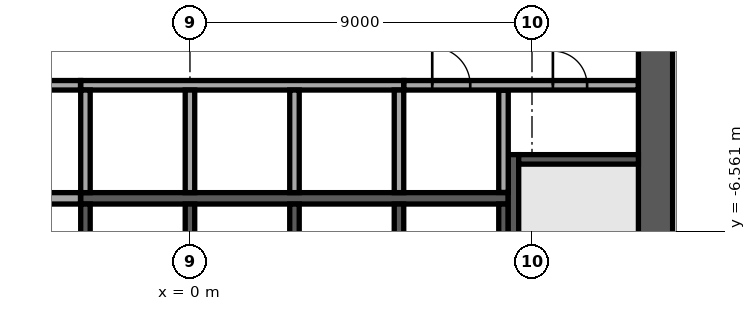
"""IFC4 building model, lengths in metres.
Left out: names, types, materials, properties, quantities, classifications, styles, units other than length and angle.
Written with IfcOpenShell. Run it as: python <this file> out.ifc"""

import sys

from ifc_helpers import new_model, si_unit, direction, frame, frame_2d, origin, place, context, subcontext, project, spatial, rectangle, extrude, element, fill, save


model = new_model("IFC4")
c1 = context("Model", 3, precision=1e-05, world=origin(), true_north=direction((0.0, 1.0)))
c2 = subcontext(c1, "Body", "Model", "MODEL_VIEW")
j1 = project(units=[si_unit("LENGTHUNIT", "METRE"), si_unit("PLANEANGLEUNIT", "RADIAN")], contexts=[c1])
p1 = place(None, origin())
s1 = spatial("IfcSite", under=j1, at=p1, CompositionType="ELEMENT")
p2 = place(p1, origin())
s2 = spatial("IfcBuilding", under=s1, at=p2, CompositionType="ELEMENT")
p3 = place(p2, frame((0.0, 0.0, 189.3)))
s3 = spatial("IfcBuildingStorey", under=s2, at=p3, CompositionType="ELEMENT", Elevation=189.3)
p4 = place(p3, frame((12.25, -11.8, 0.0), z_axis=(0.0, 0.0, 1.0), x_axis=(0.0, 1.0, 0.0)))
e1 = element("IfcWall", 1, at=p4, inside=s3, PredefinedType="SHEAR", context=c2, shape_type="SweptSolid", body=[
    extrude(rectangle(XDim=23.6, YDim=0.9, at=frame_2d((11.8, 0.0))), origin(), (0.0, 0.0, 1.0), 3.62),
])
p5 = place(p4, frame((10.6, 0.0, 0.0)))
e2 = element("IfcOpeningElement", 2, at=p5, cuts=e1, PredefinedType="OPENING", context=c2, shape_type="SweptSolid", body=[
    extrude(rectangle(XDim=2.4, YDim=2.4, at=frame_2d((1.2, 1.2))), frame((0.0, 0.46, 0.0), z_axis=(0.0, -1.0, 0.0), x_axis=(1.0, 0.0, 0.0)), (0.0, 0.0, 1.0), 0.92),
])
p6 = place(p3, frame((-2.875, -5.7, 0.0), z_axis=(0.0, 0.0, 1.0), x_axis=(1.0, 0.0, 0.0)))
e3 = element("IfcWall", 3, at=p6, inside=s3, PredefinedType="SOLIDWALL", context=c2, shape_type="SweptSolid", body=[
    extrude(rectangle(XDim=11.25, YDim=0.3, at=frame_2d((5.625, 0.0))), origin(), (0.0, 0.0, 1.0), 3.62),
])
p7 = place(p3, frame((-2.875, -2.725, 0.0), z_axis=(0.0, 0.0, 1.0), x_axis=(1.0, 0.0, 0.0)))
e4 = element("IfcWall", 4, at=p7, inside=s3, PredefinedType="SOLIDWALL", context=c2, shape_type="SweptSolid", body=[
    extrude(rectangle(XDim=8.5, YDim=0.25, at=frame_2d((4.25, 0.0))), origin(), (0.0, 0.0, 1.0), 3.62),
])
for number, where, z_axis, x_axis in (
    (5, (-2.75, -5.55, 0.0), (0.0, 0.0, 1.0), (0.0, 1.0, 0.0)),
    (6, (0.0, -5.55, 0.0), (0.0, 0.0, 1.0), (0.0, 1.0, 0.0)),
    (7, (2.75, -5.55, 0.0), (0.0, 0.0, 1.0), (0.0, 1.0, 0.0)),
    (8, (5.5, -5.55, 0.0), (0.0, 0.0, 1.0), (0.0, 1.0, 0.0)),
    (9, (-2.75, -8.55, 0.0), (0.0, 0.0, 1.0), (0.0, 1.0, 0.0)),
    (10, (0.0, -8.55, 0.0), (0.0, 0.0, 1.0), (0.0, 1.0, 0.0)),
    (11, (2.75, -8.55, 0.0), (0.0, 0.0, 1.0), (0.0, 1.0, 0.0)),
    (12, (5.5, -8.55, 0.0), (0.0, 0.0, 1.0), (0.0, 1.0, 0.0)),
    (13, (8.25, -8.55, 0.0), (0.0, 0.0, 1.0), (0.0, 1.0, 0.0)),
):
    element("IfcWall", number, at=place(p3, frame(where, z_axis=z_axis, x_axis=x_axis)), inside=s3, PredefinedType="SOLIDWALL", context=c2, shape_type="SweptSolid", body=[
        extrude(rectangle(XDim=2.7, YDim=0.25, at=frame_2d((1.35, 0.0))), origin(), (0.0, 0.0, 1.0), 3.62),
    ])
p8 = place(p3, frame((8.512, -4.55, 0.0), z_axis=(0.0, 0.0, 1.0), x_axis=(0.0, -1.0, 0.0)))
e14 = element("IfcWall", 14, at=p8, inside=s3, PredefinedType="SOLIDWALL", context=c2, shape_type="SweptSolid", body=[
    extrude(rectangle(XDim=7.25, YDim=0.275, at=frame_2d((3.625, 0.0))), origin(), (0.0, 0.0, 1.0), 3.62),
])
p9 = place(p8, frame((6.0, 0.0, 0.0)))
e15 = element("IfcOpeningElement", 15, at=p9, cuts=e14, PredefinedType="OPENING", context=c2, shape_type="SweptSolid", body=[
    extrude(rectangle(XDim=1.0, YDim=2.1, at=frame_2d((0.5, 1.05))), frame((0.0, 0.147, 0.0), z_axis=(0.0, -1.0, 0.0), x_axis=(1.0, 0.0, 0.0)), (0.0, 0.0, 1.0), 0.295),
])
p10 = place(p3, frame((8.65, -4.675, 0.0), z_axis=(0.0, 0.0, 1.0), x_axis=(1.0, 0.0, 0.0)))
e16 = element("IfcWall", 16, at=p10, inside=s3, PredefinedType="SOLIDWALL", context=c2, shape_type="SweptSolid", body=[
    extrude(rectangle(XDim=3.15, YDim=0.25, at=frame_2d((1.575, 0.0))), origin(), (0.0, 0.0, 1.0), 3.62),
])
p11 = place(p3, frame((-8.35, -5.7, 0.0), z_axis=(0.0, 0.0, 1.0), x_axis=(1.0, 0.0, 0.0)))
e17 = element("IfcWall", 17, at=p11, inside=s3, PredefinedType="PARTITIONING", context=c2, shape_type="SweptSolid", body=[
    extrude(rectangle(XDim=5.47, YDim=0.3, at=frame_2d((2.735, 0.0))), origin(), (0.0, 0.0, 1.0), 3.62),
])
p12 = place(p3, frame((8.25, -5.545, 0.0), z_axis=(0.0, 0.0, 1.0), x_axis=(0.0, 1.0, 0.0)))
e18 = element("IfcWall", 18, at=p12, inside=s3, PredefinedType="PARTITIONING", context=c2, shape_type="SweptSolid", body=[
    extrude(rectangle(XDim=2.69, YDim=0.25, at=frame_2d((1.345, 0.0))), origin(), (0.0, 0.0, 1.0), 3.62),
])
p13 = place(p3, frame((-11.795, -2.725, 0.0), z_axis=(0.0, 0.0, 1.0), x_axis=(1.0, 0.0, 0.0)))
e19 = element("IfcWall", 19, at=p13, inside=s3, PredefinedType="PARTITIONING", context=c2, shape_type="SweptSolid", body=[
    extrude(rectangle(XDim=8.915, YDim=0.25, at=frame_2d((4.458, 0.0))), origin(), (0.0, 0.0, 1.0), 3.62),
])
p14 = place(p13, frame((1.295, 0.0, 0.0)))
e20 = element("IfcOpeningElement", 20, at=p14, cuts=e19, PredefinedType="OPENING", context=c2, shape_type="SweptSolid", body=[
    extrude(rectangle(XDim=1.0, YDim=2.1, at=frame_2d((0.5, 1.05))), frame((0.0, 0.135, 0.0), z_axis=(0.0, -1.0, 0.0), x_axis=(1.0, 0.0, 0.0)), (0.0, 0.0, 1.0), 0.27),
])
p15 = place(p13, frame((4.42, 0.0, 0.0)))
e21 = element("IfcOpeningElement", 21, at=p15, cuts=e19, PredefinedType="OPENING", context=c2, shape_type="SweptSolid", body=[
    extrude(rectangle(XDim=1.0, YDim=2.1, at=frame_2d((0.5, 1.05))), frame((0.0, 0.135, 0.0), z_axis=(0.0, -1.0, 0.0), x_axis=(1.0, 0.0, 0.0)), (0.0, 0.0, 1.0), 0.27),
])
p16 = place(p3, frame((5.63, -2.725, 0.0), z_axis=(0.0, 0.0, 1.0), x_axis=(1.0, 0.0, 0.0)))
e22 = element("IfcWall", 22, at=p16, inside=s3, PredefinedType="PARTITIONING", context=c2, shape_type="SweptSolid", body=[
    extrude(rectangle(XDim=6.165, YDim=0.25, at=frame_2d((3.083, 0.0))), origin(), (0.0, 0.0, 1.0), 3.62),
])
p17 = place(p16, frame((0.745, 0.0, 0.0)))
e23 = element("IfcOpeningElement", 23, at=p17, cuts=e22, PredefinedType="OPENING", context=c2, shape_type="SweptSolid", body=[
    extrude(rectangle(XDim=1.0, YDim=2.1, at=frame_2d((0.5, 1.05))), frame((0.0, 0.135, 0.0), z_axis=(0.0, -1.0, 0.0), x_axis=(1.0, 0.0, 0.0)), (0.0, 0.0, 1.0), 0.27),
])
p18 = place(p16, frame((3.92, 0.0, 0.0)))
e24 = element("IfcOpeningElement", 24, at=p18, cuts=e22, PredefinedType="OPENING", context=c2, shape_type="SweptSolid", body=[
    extrude(rectangle(XDim=0.9, YDim=2.1, at=frame_2d((0.45, 1.05))), frame((0.0, 0.135, 0.0), z_axis=(0.0, -1.0, 0.0), x_axis=(1.0, 0.0, 0.0)), (0.0, 0.0, 1.0), 0.27),
])
p19 = place(p3, frame((-2.286, -34.715, 0.0), z_axis=(0.0, 0.0, 1.0), x_axis=(0.754708272811, 0.656060532993, 0.0)))
e25 = element("IfcWall", 25, at=p19, inside=s3, PredefinedType="STANDARD", context=c2, shape_type="SweptSolid", body=[
    extrude(rectangle(XDim=49.0, YDim=0.6, at=frame_2d((24.5, 0.0))), origin(), (0.0, 0.0, 1.0), 3.62),
])
p20 = place(p19, frame((1.227, 0.0, 0.9)))
e26 = element("IfcOpeningElement", 26, at=p20, cuts=e25, PredefinedType="OPENING", context=c2, shape_type="SweptSolid", body=[
    extrude(rectangle(XDim=2.0, YDim=2.1, at=frame_2d((1.0, 1.05))), frame((0.0, 0.31, 0.0), z_axis=(0.0, -1.0, 0.0), x_axis=(1.0, 0.0, 0.0)), (0.0, 0.0, 1.0), 0.62),
])
p21 = place(p19, frame((5.682, 0.0, 0.9)))
e27 = element("IfcOpeningElement", 27, at=p21, cuts=e25, PredefinedType="OPENING", context=c2, shape_type="SweptSolid", body=[
    extrude(rectangle(XDim=2.0, YDim=2.1, at=frame_2d((1.0, 1.05))), frame((0.0, 0.31, 0.0), z_axis=(0.0, -1.0, 0.0), x_axis=(1.0, 0.0, 0.0)), (0.0, 0.0, 1.0), 0.62),
])
p22 = place(p19, frame((10.136, 0.0, 0.9)))
e28 = element("IfcOpeningElement", 28, at=p22, cuts=e25, PredefinedType="OPENING", context=c2, shape_type="SweptSolid", body=[
    extrude(rectangle(XDim=2.0, YDim=2.1, at=frame_2d((1.0, 1.05))), frame((0.0, 0.31, 0.0), z_axis=(0.0, -1.0, 0.0), x_axis=(1.0, 0.0, 0.0)), (0.0, 0.0, 1.0), 0.62),
])
p23 = place(p19, frame((14.591, 0.0, 0.9)))
e29 = element("IfcOpeningElement", 29, at=p23, cuts=e25, PredefinedType="OPENING", context=c2, shape_type="SweptSolid", body=[
    extrude(rectangle(XDim=2.0, YDim=2.1, at=frame_2d((1.0, 1.05))), frame((0.0, 0.31, 0.0), z_axis=(0.0, -1.0, 0.0), x_axis=(1.0, 0.0, 0.0)), (0.0, 0.0, 1.0), 0.62),
])
p24 = place(p19, frame((19.045, 0.0, 0.9)))
e30 = element("IfcOpeningElement", 30, at=p24, cuts=e25, PredefinedType="OPENING", context=c2, shape_type="SweptSolid", body=[
    extrude(rectangle(XDim=2.0, YDim=2.1, at=frame_2d((1.0, 1.05))), frame((0.0, 0.31, 0.0), z_axis=(0.0, -1.0, 0.0), x_axis=(1.0, 0.0, 0.0)), (0.0, 0.0, 1.0), 0.62),
])
p25 = place(p19, frame((23.5, 0.0, 0.9)))
e31 = element("IfcOpeningElement", 31, at=p25, cuts=e25, PredefinedType="OPENING", context=c2, shape_type="SweptSolid", body=[
    extrude(rectangle(XDim=2.0, YDim=2.1, at=frame_2d((1.0, 1.05))), frame((0.0, 0.31, 0.0), z_axis=(0.0, -1.0, 0.0), x_axis=(1.0, 0.0, 0.0)), (0.0, 0.0, 1.0), 0.62),
])
p26 = place(p19, frame((27.955, 0.0, 0.9)))
e32 = element("IfcOpeningElement", 32, at=p26, cuts=e25, PredefinedType="OPENING", context=c2, shape_type="SweptSolid", body=[
    extrude(rectangle(XDim=2.0, YDim=2.1, at=frame_2d((1.0, 1.05))), frame((0.0, 0.31, 0.0), z_axis=(0.0, -1.0, 0.0), x_axis=(1.0, 0.0, 0.0)), (0.0, 0.0, 1.0), 0.62),
])
p27 = place(p19, frame((32.409, 0.0, 0.9)))
e33 = element("IfcOpeningElement", 33, at=p27, cuts=e25, PredefinedType="OPENING", context=c2, shape_type="SweptSolid", body=[
    extrude(rectangle(XDim=2.0, YDim=2.1, at=frame_2d((1.0, 1.05))), frame((0.0, 0.31, 0.0), z_axis=(0.0, -1.0, 0.0), x_axis=(1.0, 0.0, 0.0)), (0.0, 0.0, 1.0), 0.62),
])
p28 = place(p19, frame((36.864, 0.0, 0.9)))
e34 = element("IfcOpeningElement", 34, at=p28, cuts=e25, PredefinedType="OPENING", context=c2, shape_type="SweptSolid", body=[
    extrude(rectangle(XDim=2.0, YDim=2.1, at=frame_2d((1.0, 1.05))), frame((0.0, 0.31, 0.0), z_axis=(0.0, -1.0, 0.0), x_axis=(1.0, 0.0, 0.0)), (0.0, 0.0, 1.0), 0.62),
])
p29 = place(p19, frame((41.318, 0.0, 0.9)))
e35 = element("IfcOpeningElement", 35, at=p29, cuts=e25, PredefinedType="OPENING", context=c2, shape_type="SweptSolid", body=[
    extrude(rectangle(XDim=2.0, YDim=2.1, at=frame_2d((1.0, 1.05))), frame((0.0, 0.31, 0.0), z_axis=(0.0, -1.0, 0.0), x_axis=(1.0, 0.0, 0.0)), (0.0, 0.0, 1.0), 0.62),
])
p30 = place(p19, frame((45.773, 0.0, 0.9)))
e36 = element("IfcOpeningElement", 36, at=p30, cuts=e25, PredefinedType="OPENING", context=c2, shape_type="SweptSolid", body=[
    extrude(rectangle(XDim=2.0, YDim=2.1, at=frame_2d((1.0, 1.05))), frame((0.0, 0.31, 0.0), z_axis=(0.0, -1.0, 0.0), x_axis=(1.0, 0.0, 0.0)), (0.0, 0.0, 1.0), 0.62),
])
p31 = place(p3, frame((-1.0, -26.268, 0.0), z_axis=(0.0, 0.0, 1.0), x_axis=(0.754711356604, 0.656056985492, 0.0)))
e37 = element("IfcWall", 37, at=p31, inside=s3, PredefinedType="PARTITIONING", context=c2, shape_type="SweptSolid", body=[
    extrude(rectangle(XDim=36.052, YDim=0.15, at=frame_2d((18.026, 0.0))), origin(), (0.0, 0.0, 1.0), 3.17),
])
p32 = place(p31, frame((9.598, 0.0, 0.0)))
e38 = element("IfcOpeningElement", 38, at=p32, cuts=e37, PredefinedType="OPENING", context=c2, shape_type="SweptSolid", body=[
    extrude(rectangle(XDim=1.0, YDim=2.1, at=frame_2d((0.5, 1.05))), frame((0.0, 0.085, 0.0), z_axis=(0.0, -1.0, 0.0), x_axis=(1.0, 0.0, 0.0)), (0.0, 0.0, 1.0), 0.17),
])
p33 = place(p31, frame((20.957, 0.0, 0.0)))
e39 = element("IfcOpeningElement", 39, at=p33, cuts=e37, PredefinedType="OPENING", context=c2, shape_type="SweptSolid", body=[
    extrude(rectangle(XDim=1.0, YDim=2.1, at=frame_2d((0.5, 1.05))), frame((0.0, 0.085, 0.0), z_axis=(0.0, -1.0, 0.0), x_axis=(1.0, 0.0, 0.0)), (0.0, 0.0, 1.0), 0.17),
])
p34 = place(p31, frame((27.87, 0.0, 0.0)))
e40 = element("IfcOpeningElement", 40, at=p34, cuts=e37, PredefinedType="OPENING", context=c2, shape_type="SweptSolid", body=[
    extrude(rectangle(XDim=1.8, YDim=2.1, at=frame_2d((0.9, 1.05))), frame((0.0, 0.085, 0.0), z_axis=(0.0, -1.0, 0.0), x_axis=(1.0, 0.0, 0.0)), (0.0, 0.0, 1.0), 0.17),
])
p35 = place(p17, origin())
e41 = element("IfcDoor", 41, at=p35, inside=s3, OperationType="SINGLE_SWING_LEFT", PredefinedType="DOOR", context=c2, shape_type="SweptSolid", body=[
    extrude(rectangle(XDim=1.0, YDim=2.1, at=frame_2d((0.5, 1.05))), frame((0.0, 0.025, 0.0), z_axis=(0.0, -1.0, 0.0), x_axis=(1.0, 0.0, 0.0)), (0.0, 0.0, 1.0), 0.05),
])
fill(e23, e41)
p36 = place(p18, origin())
e42 = element("IfcDoor", 42, at=p36, inside=s3, OperationType="SINGLE_SWING_LEFT", PredefinedType="DOOR", context=c2, shape_type="SweptSolid", body=[
    extrude(rectangle(XDim=0.9, YDim=2.1, at=frame_2d((0.45, 1.05))), frame((0.0, 0.025, 0.0), z_axis=(0.0, -1.0, 0.0), x_axis=(1.0, 0.0, 0.0)), (0.0, 0.0, 1.0), 0.05),
])
fill(e24, e42)
save(model, sys.argv[1])
